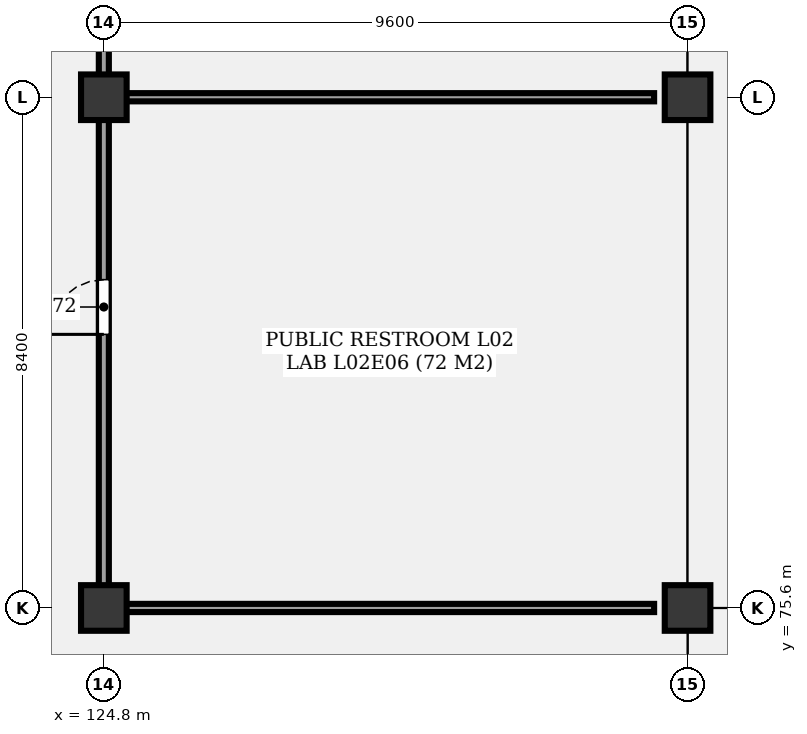
"""IFC4 building model, lengths in metres.
Left out: names, types, materials, properties, quantities, classifications, styles, units other than length and angle.
Written with IfcOpenShell. Run it as: python <this file> out.ifc"""

import sys

from ifc_helpers import new_model, si_unit, direction, frame, frame_2d, origin, origin_2d, place, context, subcontext, project, spatial, rectangle, extrude, element, fill, save


model = new_model("IFC4")
c1 = context("Model", 3, precision=1e-05, world=origin(), true_north=direction((0.0, 1.0)))
c2 = subcontext(c1, "Body", "Model", "MODEL_VIEW")
j1 = project(units=[si_unit("LENGTHUNIT", "METRE"), si_unit("PLANEANGLEUNIT", "RADIAN")], contexts=[c1])
p1 = place(None, origin())
s1 = spatial("IfcSite", under=j1, at=p1, CompositionType="ELEMENT")
p2 = place(p1, origin())
s2 = spatial("IfcBuilding", under=s1, at=p2, CompositionType="ELEMENT")
p3 = place(p2, frame((0.0, 0.0, 9.9)))
s3 = spatial("IfcBuildingStorey", under=s2, at=p3, CompositionType="ELEMENT", Elevation=9.9)
for number, where, z_axis, x_axis in (
    (1, (124.8, 75.6, 0.0), (0.0, 0.0, 1.0), (1.0, 0.0, 0.0)),
    (2, (124.8, 84.0, 0.0), (0.0, 0.0, 1.0), (1.0, 0.0, 0.0)),
    (3, (134.4, 75.6, 0.0), (0.0, 0.0, 1.0), (1.0, 0.0, 0.0)),
    (4, (134.4, 84.0, 0.0), (0.0, 0.0, 1.0), (1.0, 0.0, 0.0)),
):
    element("IfcColumn", number, at=place(p3, frame(where, z_axis=z_axis, x_axis=x_axis)), inside=s3, PredefinedType="COLUMN", context=c2, shape_type="SweptSolid", body=[
        extrude(rectangle(XDim=0.75, YDim=0.75, at=origin_2d()), origin(), (0.0, 0.0, 1.0), 3.6),
    ])
p4 = place(p3, frame((124.8, 75.85, 0.0), z_axis=(0.0, 0.0, 1.0), x_axis=(0.0, 1.0, 0.0)))
e5 = element("IfcWall", 5, at=p4, inside=s3, PredefinedType="PARTITIONING", context=c2, shape_type="SweptSolid", body=[
    extrude(rectangle(XDim=7.9, YDim=0.165, at=frame_2d((3.95, 0.0))), origin(), (0.0, 0.0, 1.0), 2.48),
])
p5 = place(p4, frame((4.25, 0.0, 0.0)))
e6 = element("IfcOpeningElement", 6, at=p5, cuts=e5, PredefinedType="OPENING", context=c2, shape_type="SweptSolid", body=[
    extrude(rectangle(XDim=0.9, YDim=2.1, at=frame_2d((0.45, 1.05))), frame((0.0, 0.093, 0.0), z_axis=(0.0, -1.0, 0.0), x_axis=(1.0, 0.0, 0.0)), (0.0, 0.0, 1.0), 0.185),
])
p6 = place(p3, frame((124.95, 75.6, 0.0), z_axis=(0.0, 0.0, 1.0), x_axis=(1.0, 0.0, 0.0)))
e7 = element("IfcWall", 7, at=p6, inside=s3, PredefinedType="PARTITIONING", context=c2, shape_type="SweptSolid", body=[
    extrude(rectangle(XDim=8.9, YDim=0.135, at=frame_2d((4.45, 0.0))), origin(), (0.0, 0.0, 1.0), 2.48),
])
p7 = place(p3, frame((124.8, 84.25, 0.0), z_axis=(0.0, 0.0, 1.0), x_axis=(0.0, 1.0, 0.0)))
e8 = element("IfcWall", 8, at=p7, inside=s3, PredefinedType="PARTITIONING", context=c2, shape_type="SweptSolid", body=[
    extrude(rectangle(XDim=7.9, YDim=0.165, at=frame_2d((3.95, 0.0))), origin(), (0.0, 0.0, 1.0), 2.48),
])
p8 = place(p7, frame((4.25, 0.0, 0.0)))
e9 = element("IfcOpeningElement", 9, at=p8, cuts=e8, PredefinedType="OPENING", context=c2, shape_type="SweptSolid", body=[
    extrude(rectangle(XDim=1.0, YDim=2.2, at=frame_2d((0.5, 1.1))), frame((0.0, 0.093, 0.0), z_axis=(0.0, -1.0, 0.0), x_axis=(1.0, 0.0, 0.0)), (0.0, 0.0, 1.0), 0.185),
])
p9 = place(p3, frame((124.95, 84.0, 0.0), z_axis=(0.0, 0.0, 1.0), x_axis=(1.0, 0.0, 0.0)))
e10 = element("IfcWall", 10, at=p9, inside=s3, PredefinedType="PARTITIONING", context=c2, shape_type="SweptSolid", body=[
    extrude(rectangle(XDim=8.9, YDim=0.135, at=frame_2d((4.45, 0.0))), origin(), (0.0, 0.0, 1.0), 2.48),
])
p10 = place(p5, origin())
e11 = element("IfcDoor", 11, at=p10, inside=s3, OperationType="SINGLE_SWING_LEFT", PredefinedType="DOOR", context=c2, shape_type="SweptSolid", body=[
    extrude(rectangle(XDim=0.9, YDim=2.1, at=frame_2d((0.45, 1.05))), frame((0.0, 0.025, 0.0), z_axis=(0.0, -1.0, 0.0), x_axis=(1.0, 0.0, 0.0)), (0.0, 0.0, 1.0), 0.05),
])
fill(e6, e11)
save(model, sys.argv[1])
